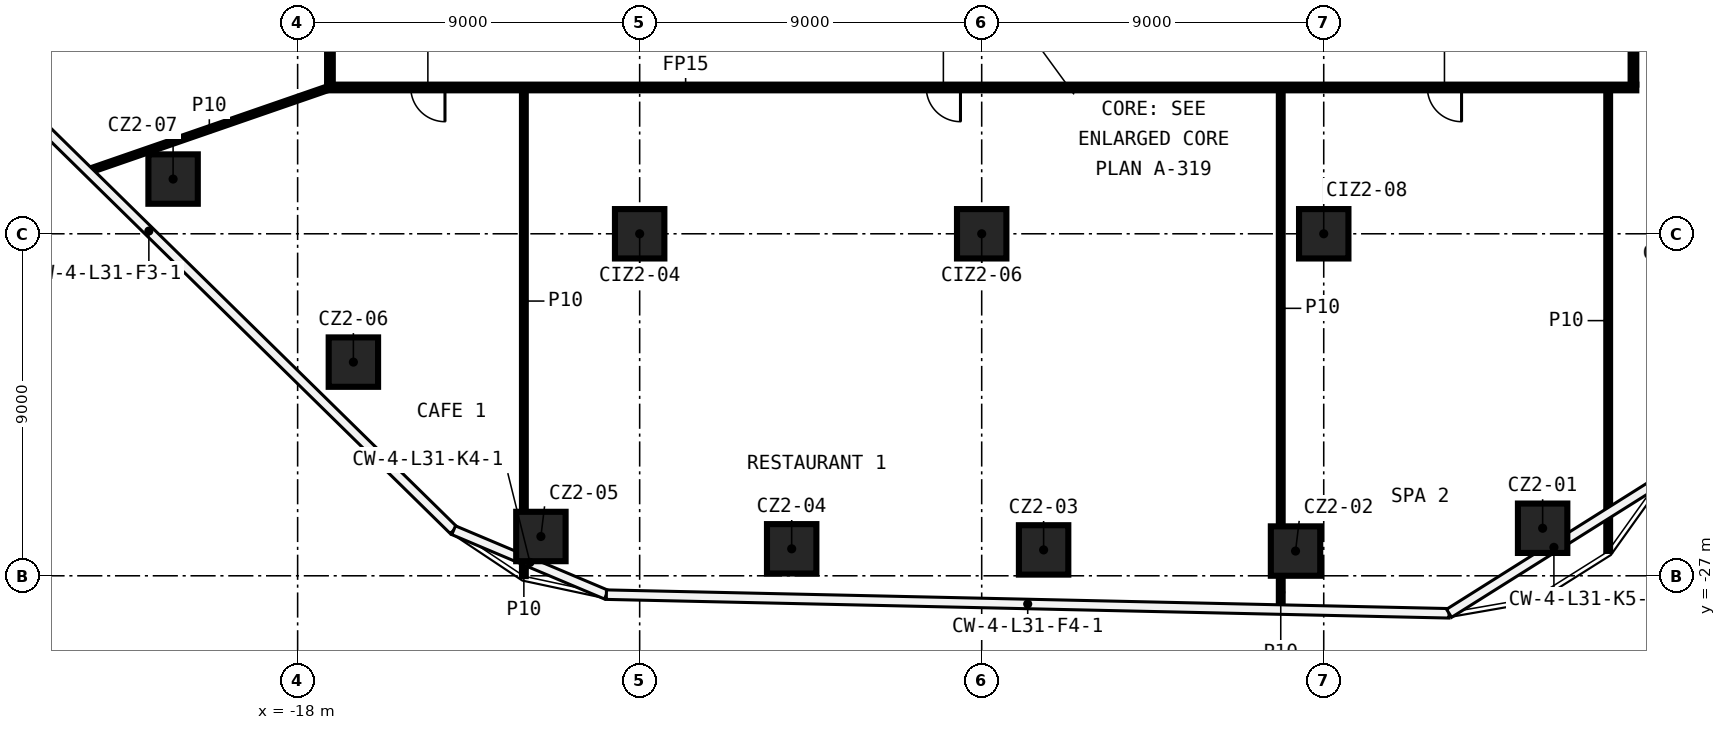
"""IFC4 building model, lengths in metres.
Left out: names, types, materials, properties, quantities, classifications, styles, units other than length and angle.
Written with IfcOpenShell. Run it as: python <this file> out.ifc"""

import sys

from ifc_helpers import new_model, si_unit, direction, frame, frame_2d, origin, origin_2d, place, context, subcontext, project, spatial, rectangle, extrude, element, fill, save


model = new_model("IFC4")
c1 = context("Model", 3, precision=1e-05, world=origin(), true_north=direction((0.0, 1.0)))
c2 = subcontext(c1, "Body", "Model", "MODEL_VIEW")
j1 = project(units=[si_unit("LENGTHUNIT", "METRE"), si_unit("PLANEANGLEUNIT", "RADIAN")], contexts=[c1])
p1 = place(None, origin())
s1 = spatial("IfcSite", under=j1, at=p1, CompositionType="ELEMENT")
p2 = place(p1, origin())
s2 = spatial("IfcBuilding", under=s1, at=p2, CompositionType="ELEMENT")
p3 = place(p2, frame((0.0, 0.0, 139.6)))
s3 = spatial("IfcBuildingStorey", under=s2, at=p3, CompositionType="ELEMENT", Elevation=139.6)
for number, where, z_axis, x_axis in (
    (1, (14.76, -25.749, 0.0), (0.0, 0.0, 1.0), (1.0, 0.0, 0.0)),
    (2, (8.258, -26.349, 0.0), (0.0, 0.0, 1.0), (1.0, 0.0, 0.0)),
    (3, (1.629, -26.319, 0.0), (0.0, 0.0, 1.0), (1.0, 0.0, 0.0)),
    (4, (-5.0, -26.29, 0.0), (0.0, 0.0, 1.0), (1.0, 0.0, 0.0)),
    (5, (-11.599, -25.966, 0.0), (0.0, 0.0, 1.0), (1.0, 0.0, 0.0)),
    (6, (-16.533, -21.377, 0.0), (0.0, 0.0, 1.0), (1.0, 0.0, 0.0)),
    (7, (-21.277, -16.56, 0.0), (0.0, 0.0, 1.0), (1.0, 0.0, 0.0)),
    (8, (-9.0, -18.0, 0.0), (0.0, 0.0, 1.0), (1.0, 0.0, 0.0)),
    (9, (0.0, -18.0, 0.0), (0.0, 0.0, 1.0), (1.0, 0.0, 0.0)),
    (10, (9.0, -18.0, 0.0), (0.0, 0.0, 1.0), (1.0, 0.0, 0.0)),
):
    element("IfcColumn", number, at=place(p3, frame(where, z_axis=z_axis, x_axis=x_axis)), inside=s3, PredefinedType="COLUMN", context=c2, shape_type="SweptSolid", body=[
        extrude(rectangle(XDim=1.3, YDim=1.3, at=origin_2d()), origin(), (0.0, 0.0, 1.0), 5.4),
    ])
p4 = place(p3, frame((17.225, -14.15, 0.0), z_axis=(0.0, 0.0, 1.0), x_axis=(-1.0, 0.0, 0.0)))
e11 = element("IfcWall", 11, at=p4, inside=s3, PredefinedType="PARTITIONING", context=c2, shape_type="SweptSolid", body=[
    extrude(rectangle(XDim=34.45, YDim=0.15, at=frame_2d((17.225, 0.0))), origin(), (0.0, 0.0, 1.0), 5.4),
])
p5 = place(p4, frame((31.348, 0.0, 0.0)))
e12 = element("IfcOpeningElement", 12, at=p5, cuts=e11, PredefinedType="OPENING", context=c2, shape_type="SweptSolid", body=[
    extrude(rectangle(XDim=0.9, YDim=2.1, at=frame_2d((0.45, 1.05))), frame((0.0, 0.085, 0.0), z_axis=(0.0, -1.0, 0.0), x_axis=(1.0, 0.0, 0.0)), (0.0, 0.0, 1.0), 0.17),
])
p6 = place(p4, frame((17.783, 0.0, 0.0)))
e13 = element("IfcOpeningElement", 13, at=p6, cuts=e11, PredefinedType="OPENING", context=c2, shape_type="SweptSolid", body=[
    extrude(rectangle(XDim=0.9, YDim=2.1, at=frame_2d((0.45, 1.05))), frame((0.0, 0.085, 0.0), z_axis=(0.0, -1.0, 0.0), x_axis=(1.0, 0.0, 0.0)), (0.0, 0.0, 1.0), 0.17),
])
p7 = place(p4, frame((4.598, 0.0, 0.0)))
e14 = element("IfcOpeningElement", 14, at=p7, cuts=e11, PredefinedType="OPENING", context=c2, shape_type="SweptSolid", body=[
    extrude(rectangle(XDim=0.9, YDim=2.1, at=frame_2d((0.45, 1.05))), frame((0.0, 0.085, 0.0), z_axis=(0.0, -1.0, 0.0), x_axis=(1.0, 0.0, 0.0)), (0.0, 0.0, 1.0), 0.17),
])
p8 = place(p3, frame((-23.498, -16.346, 0.0), z_axis=(0.0, 0.0, 1.0), x_axis=(0.945057352494, 0.326904573991, 0.0)))
e15 = element("IfcWall", 15, at=p8, inside=s3, PredefinedType="PARTITIONING", context=c2, shape_type="SweptSolid", body=[
    extrude(rectangle(XDim=6.717, YDim=0.1, at=frame_2d((3.358, 0.0))), origin(), (0.0, 0.0, 1.0), 5.4),
])
p9 = place(p3, frame((17.15, 14.075, 0.0), z_axis=(0.0, 0.0, 1.0), x_axis=(0.0, -1.0, 0.0)))
e16 = element("IfcWall", 16, at=p9, inside=s3, PredefinedType="PARTITIONING", context=c2, shape_type="SweptSolid", body=[
    extrude(rectangle(XDim=28.15, YDim=0.15, at=frame_2d((14.075, 0.0))), origin(), (0.0, 0.0, 1.0), 5.4),
])
p10 = place(p9, frame((18.235, 0.0, 0.0)))
e17 = element("IfcOpeningElement", 17, at=p10, cuts=e16, PredefinedType="OPENING", context=c2, shape_type="SweptSolid", body=[
    extrude(rectangle(XDim=0.9, YDim=2.1, at=frame_2d((0.45, 1.05))), frame((0.0, 0.085, 0.0), z_axis=(0.0, -1.0, 0.0), x_axis=(1.0, 0.0, 0.0)), (0.0, 0.0, 1.0), 0.17),
])
p11 = place(p9, frame((11.174, 0.0, 0.0)))
e18 = element("IfcOpeningElement", 18, at=p11, cuts=e16, PredefinedType="OPENING", context=c2, shape_type="SweptSolid", body=[
    extrude(rectangle(XDim=0.9, YDim=2.1, at=frame_2d((0.45, 1.05))), frame((0.0, 0.085, 0.0), z_axis=(0.0, -1.0, 0.0), x_axis=(1.0, 0.0, 0.0)), (0.0, 0.0, 1.0), 0.17),
])
p12 = place(p9, frame((7.242, 0.0, 0.0)))
e19 = element("IfcOpeningElement", 19, at=p12, cuts=e16, PredefinedType="OPENING", context=c2, shape_type="SweptSolid", body=[
    extrude(rectangle(XDim=0.9, YDim=2.1, at=frame_2d((0.45, 1.05))), frame((0.0, 0.085, 0.0), z_axis=(0.0, -1.0, 0.0), x_axis=(1.0, 0.0, 0.0)), (0.0, 0.0, 1.0), 0.17),
])
p13 = place(p3, frame((16.485, -26.345, 0.0), z_axis=(0.0, 0.0, 1.0), x_axis=(0.0, 1.0, 0.0)))
e20 = element("IfcWall", 20, at=p13, inside=s3, PredefinedType="PARTITIONING", context=c2, shape_type="SweptSolid", body=[
    extrude(rectangle(XDim=12.12, YDim=0.1, at=frame_2d((6.06, 0.0))), origin(), (0.0, 0.0, 1.0), 5.4),
])
p14 = place(p3, frame((7.869, -27.869, 0.0), z_axis=(0.0, 0.0, 1.0), x_axis=(0.0, 1.0, 0.0)))
e21 = element("IfcWall", 21, at=p14, inside=s3, PredefinedType="PARTITIONING", context=c2, shape_type="SweptSolid", body=[
    extrude(rectangle(XDim=0.87, YDim=0.1, at=frame_2d((0.435, 0.0))), origin(), (0.0, 0.0, 1.0), 5.4),
])
p15 = place(p3, frame((7.869, -25.699, 0.0), z_axis=(0.0, 0.0, 1.0), x_axis=(0.0, 1.0, 0.0)))
e22 = element("IfcWall", 22, at=p15, inside=s3, PredefinedType="PARTITIONING", context=c2, shape_type="SweptSolid", body=[
    extrude(rectangle(XDim=11.474, YDim=0.1, at=frame_2d((5.737, 0.0))), origin(), (0.0, 0.0, 1.0), 5.4),
])
p16 = place(p3, frame((-12.047, -27.008, 0.0), z_axis=(0.0, 0.0, 1.0), x_axis=(0.0, 1.0, 0.0)))
e23 = element("IfcWall", 23, at=p16, inside=s3, PredefinedType="PARTITIONING", context=c2, shape_type="SweptSolid", body=[
    extrude(rectangle(XDim=0.392, YDim=0.1, at=frame_2d((0.196, 0.0))), origin(), (0.0, 0.0, 1.0), 5.4),
])
p17 = place(p3, frame((-12.047, -25.316, 0.0), z_axis=(0.0, 0.0, 1.0), x_axis=(0.0, 1.0, 0.0)))
e24 = element("IfcWall", 24, at=p17, inside=s3, PredefinedType="PARTITIONING", context=c2, shape_type="SweptSolid", body=[
    extrude(rectangle(XDim=11.091, YDim=0.1, at=frame_2d((5.545, 0.0))), origin(), (0.0, 0.0, 1.0), 5.4),
])
p18 = place(p3, frame((-17.15, -14.075, 0.0), z_axis=(0.0, 0.0, 1.0), x_axis=(0.0, 1.0, 0.0)))
e25 = element("IfcWall", 25, at=p18, inside=s3, PredefinedType="PARTITIONING", context=c2, shape_type="SweptSolid", body=[
    extrude(rectangle(XDim=28.15, YDim=0.15, at=frame_2d((14.075, 0.0))), origin(), (0.0, 0.0, 1.0), 5.4),
])
p19 = place(p18, frame((2.125, 0.0, 0.0)))
e26 = element("IfcOpeningElement", 26, at=p19, cuts=e25, PredefinedType="OPENING", context=c2, shape_type="SweptSolid", body=[
    extrude(rectangle(XDim=0.9, YDim=2.1, at=frame_2d((0.45, 1.05))), frame((0.0, 0.085, 0.0), z_axis=(0.0, -1.0, 0.0), x_axis=(1.0, 0.0, 0.0)), (0.0, 0.0, 1.0), 0.17),
])
p20 = place(p18, frame((25.303, 0.0, 0.0)))
e27 = element("IfcOpeningElement", 27, at=p20, cuts=e25, PredefinedType="OPENING", context=c2, shape_type="SweptSolid", body=[
    extrude(rectangle(XDim=0.9, YDim=2.1, at=frame_2d((0.45, 1.05))), frame((0.0, 0.085, 0.0), z_axis=(0.0, -1.0, 0.0), x_axis=(1.0, 0.0, 0.0)), (0.0, 0.0, 1.0), 0.17),
])
p21 = place(p18, frame((18.259, 0.0, 0.0)))
e28 = element("IfcOpeningElement", 28, at=p21, cuts=e25, PredefinedType="OPENING", context=c2, shape_type="SweptSolid", body=[
    extrude(rectangle(XDim=0.9, YDim=2.1, at=frame_2d((0.45, 1.05))), frame((0.0, 0.085, 0.0), z_axis=(0.0, -1.0, 0.0), x_axis=(1.0, 0.0, 0.0)), (0.0, 0.0, 1.0), 0.17),
])
p22 = place(p5, origin())
e29 = element("IfcDoor", 29, at=p22, inside=s3, OperationType="SINGLE_SWING_LEFT", PredefinedType="DOOR", context=c2, shape_type="SweptSolid", body=[
    extrude(rectangle(XDim=0.9, YDim=2.1, at=frame_2d((0.45, 1.05))), frame((0.0, 0.025, 0.0), z_axis=(0.0, -1.0, 0.0), x_axis=(1.0, 0.0, 0.0)), (0.0, 0.0, 1.0), 0.05),
])
fill(e12, e29)
p23 = place(p6, origin())
e30 = element("IfcDoor", 30, at=p23, inside=s3, OperationType="SINGLE_SWING_RIGHT", PredefinedType="DOOR", context=c2, shape_type="SweptSolid", body=[
    extrude(rectangle(XDim=0.9, YDim=2.1, at=frame_2d((0.45, 1.05))), frame((0.0, 0.025, 0.0), z_axis=(0.0, -1.0, 0.0), x_axis=(1.0, 0.0, 0.0)), (0.0, 0.0, 1.0), 0.05),
])
fill(e13, e30)
p24 = place(p7, origin())
e31 = element("IfcDoor", 31, at=p24, inside=s3, OperationType="SINGLE_SWING_LEFT", PredefinedType="DOOR", context=c2, shape_type="SweptSolid", body=[
    extrude(rectangle(XDim=0.9, YDim=2.1, at=frame_2d((0.45, 1.05))), frame((0.0, 0.025, 0.0), z_axis=(0.0, -1.0, 0.0), x_axis=(1.0, 0.0, 0.0)), (0.0, 0.0, 1.0), 0.05),
])
fill(e14, e31)
save(model, sys.argv[1])
